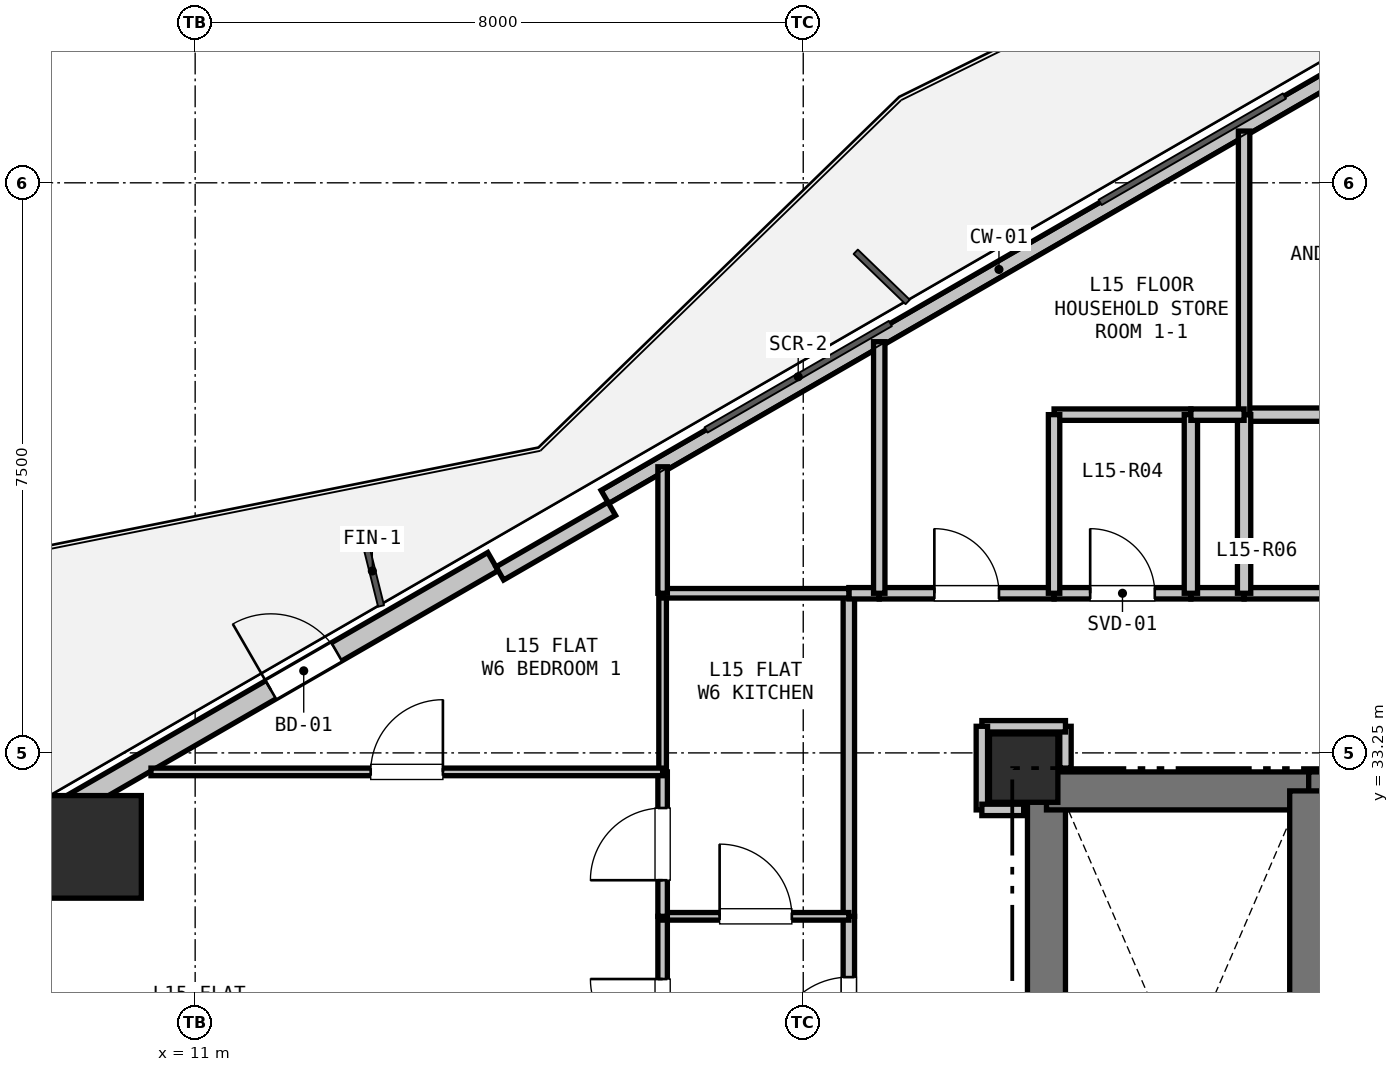
"""IFC4 building model, lengths in metres.
Left out: names, types, materials, properties, quantities, classifications, styles, units other than length and angle.
Written with IfcOpenShell. Run it as: python <this file> out.ifc"""

import sys

from ifc_helpers import new_model, si_unit, direction, frame, frame_2d, origin, origin_2d, place, context, subcontext, project, spatial, rectangle, hollow_rectangle, extrude, element, fill, save


model = new_model("IFC4")
c1 = context("Model", 3, precision=1e-05, world=origin(), true_north=direction((0.0, 1.0)))
c2 = subcontext(c1, "Body", "Model", "MODEL_VIEW")
j1 = project(units=[si_unit("LENGTHUNIT", "METRE"), si_unit("PLANEANGLEUNIT", "RADIAN")], contexts=[c1])
p1 = place(None, origin())
s1 = spatial("IfcSite", under=j1, at=p1, CompositionType="ELEMENT")
p2 = place(p1, origin())
s2 = spatial("IfcBuilding", under=s1, at=p2, CompositionType="ELEMENT")
p3 = place(p2, frame((0.0, 0.0, 55.5)))
s3 = spatial("IfcBuildingStorey", under=s2, at=p3, CompositionType="ELEMENT", Elevation=55.5)
p4 = place(p3, frame((21.9, 33.05, 0.0), z_axis=(0.0, 0.0, 1.0), x_axis=(1.0, 0.0, 0.0)))
e1 = element("IfcColumn", 1, at=p4, inside=s3, PredefinedType="COLUMN", context=c2, shape_type="SweptSolid", body=[
    extrude(rectangle(XDim=0.9, YDim=0.9, at=origin_2d()), origin(), (0.0, 0.0, 1.0), 3.3),
])
p5 = place(p3, frame((9.617, 32.014, 0.0), z_axis=(0.0, 0.0, 1.0), x_axis=(1.0, 0.0, 0.0)))
e2 = element("IfcColumn", 2, at=p5, inside=s3, PredefinedType="COLUMN", context=c2, shape_type="SweptSolid", body=[
    extrude(hollow_rectangle(XDim=1.35, YDim=1.35, WallThickness=0.036, at=origin_2d()), origin(), (0.0, 0.0, 1.0), 3.3),
])
p6 = place(p3, frame((3.943, 29.431, 0.0), z_axis=(0.0, 0.0, 1.0), x_axis=(0.866027105532, 0.499997052475, 0.0)))
e3 = element("IfcWall", 3, at=p6, inside=s3, PredefinedType="SOLIDWALL", context=c2, shape_type="SweptSolid", body=[
    extrude(rectangle(XDim=12.673, YDim=0.275, at=frame_2d((6.336, 0.0))), origin(), (0.0, 0.0, 1.0), 2.66),
])
p7 = place(p6, frame((9.298, 0.0, 0.0)))
e4 = element("IfcOpeningElement", 4, at=p7, cuts=e3, PredefinedType="OPENING", context=c2, shape_type="SweptSolid", body=[
    extrude(rectangle(XDim=1.0, YDim=2.1, at=frame_2d((0.5, 1.05))), frame((0.0, 0.147, 0.0), z_axis=(0.0, -1.0, 0.0), x_axis=(1.0, 0.0, 0.0)), (0.0, 0.0, 1.0), 0.295),
])
p8 = place(p3, frame((16.39, 36.617, 0.0), z_axis=(0.0, 0.0, 1.0), x_axis=(0.866027351828, 0.499996625875, 0.0)))
e5 = element("IfcWall", 5, at=p8, inside=s3, PredefinedType="PARAPET", context=c2, shape_type="SweptSolid", body=[
    extrude(rectangle(XDim=11.973, YDim=0.2, at=frame_2d((5.987, 0.0))), origin(), (0.0, 0.0, 1.0), 0.2),
])
p9 = place(p3, frame((15.008, 35.611, 0.0), z_axis=(0.0, 0.0, 1.0), x_axis=(0.86605165483, 0.499954529098, 0.0)))
e6 = element("IfcWall", 6, at=p9, inside=s3, PredefinedType="PARAPET", context=c2, shape_type="SweptSolid", body=[
    extrude(rectangle(XDim=1.7, YDim=0.2, at=frame_2d((0.85, 0.0))), origin(), (0.0, 0.0, 1.0), 2.66),
])
p10 = place(p3, frame((22.2, 25.4, 0.0), z_axis=(0.0, 0.0, 1.0), x_axis=(0.0, 1.0, 0.0)))
e7 = element("IfcWall", 7, at=p10, inside=s3, PredefinedType="SHEAR", context=c2, shape_type="SweptSolid", body=[
    extrude(rectangle(XDim=7.35, YDim=0.5, at=frame_2d((3.675, 0.0))), origin(), (0.0, 0.0, 1.0), 3.04),
])
p11 = place(p3, frame((22.2, 32.75, 0.0), z_axis=(0.0, 0.0, 1.0), x_axis=(1.0, 0.0, 0.0)))
e8 = element("IfcWall", 8, at=p11, inside=s3, PredefinedType="SHEAR", context=c2, shape_type="SweptSolid", body=[
    extrude(rectangle(XDim=3.45, YDim=0.5, at=frame_2d((1.725, 0.0))), origin(), (0.0, 0.0, 1.0), 3.04),
])
p12 = place(p3, frame((25.65, 32.75, 0.0), z_axis=(0.0, 0.0, 1.0), x_axis=(1.0, 0.0, 0.0)))
e9 = element("IfcWall", 9, at=p12, inside=s3, PredefinedType="SHEAR", context=c2, shape_type="SweptSolid", body=[
    extrude(rectangle(XDim=1.75, YDim=0.5, at=frame_2d((0.875, 0.0))), origin(), (0.0, 0.0, 1.0), 3.04),
])
p13 = place(p12, frame((0.375, 0.0, 0.0)))
e10 = element("IfcOpeningElement", 10, at=p13, cuts=e9, PredefinedType="OPENING", context=c2, shape_type="SweptSolid", body=[
    extrude(rectangle(XDim=1.0, YDim=2.15, at=frame_2d((0.5, 1.075))), frame((0.0, 0.26, 0.0), z_axis=(0.0, -1.0, 0.0), x_axis=(1.0, 0.0, 0.0)), (0.0, 0.0, 1.0), 0.52),
])
p14 = place(p3, frame((25.65, 27.95, 0.0), z_axis=(0.0, 0.0, 1.0), x_axis=(0.0, 1.0, 0.0)))
e11 = element("IfcWall", 11, at=p14, inside=s3, PredefinedType="SHEAR", context=c2, shape_type="SweptSolid", body=[
    extrude(rectangle(XDim=4.8, YDim=0.5, at=frame_2d((2.4, 0.0))), origin(), (0.0, 0.0, 1.0), 3.04),
])
p15 = place(p3, frame((19.6, 28.5, 0.0), z_axis=(0.0, 0.0, 1.0), x_axis=(0.0, 1.0, 0.0)))
e12 = element("IfcWall", 12, at=p15, inside=s3, PredefinedType="PARTITIONING", context=c2, shape_type="SweptSolid", body=[
    extrude(rectangle(XDim=2.6, YDim=0.15, at=frame_2d((1.3, 0.0))), origin(), (0.0, 0.0, 1.0), 3.04),
])
p16 = place(p15, frame((0.8, 0.0, 0.0)))
e13 = element("IfcOpeningElement", 13, at=p16, cuts=e12, PredefinedType="OPENING", context=c2, shape_type="SweptSolid", body=[
    extrude(rectangle(XDim=1.0, YDim=2.15, at=frame_2d((0.5, 1.075))), frame((0.0, 0.085, 0.0), z_axis=(0.0, -1.0, 0.0), x_axis=(1.0, 0.0, 0.0)), (0.0, 0.0, 1.0), 0.17),
])
p17 = place(p3, frame((19.6, 31.1, 0.0), z_axis=(0.0, 0.0, 1.0), x_axis=(0.0, 1.0, 0.0)))
e14 = element("IfcWall", 14, at=p17, inside=s3, PredefinedType="PARTITIONING", context=c2, shape_type="SweptSolid", body=[
    extrude(rectangle(XDim=4.25, YDim=0.15, at=frame_2d((2.125, 0.0))), origin(), (0.0, 0.0, 1.0), 2.337),
])
p18 = place(p3, frame((19.6, 35.35, 0.0), z_axis=(0.0, 0.0, 1.0), x_axis=(1.0, 0.0, 0.0)))
e15 = element("IfcWall", 15, at=p18, inside=s3, PredefinedType="PARTITIONING", context=c2, shape_type="SweptSolid", body=[
    extrude(rectangle(XDim=0.4, YDim=0.15, at=frame_2d((0.2, 0.0))), origin(), (0.0, 0.0, 1.0), 3.04),
])
p19 = place(p3, frame((20.0, 35.35, 0.0), z_axis=(0.0, 0.0, 1.0), x_axis=(1.0, 0.0, 0.0)))
e16 = element("IfcWall", 16, at=p19, inside=s3, PredefinedType="PARTITIONING", context=c2, shape_type="SweptSolid", body=[
    extrude(rectangle(XDim=2.3, YDim=0.15, at=frame_2d((1.15, 0.0))), origin(), (0.0, 0.0, 1.0), 3.04),
])
p20 = place(p19, frame((0.725, 0.0, 0.0)))
e17 = element("IfcOpeningElement", 17, at=p20, cuts=e16, PredefinedType="OPENING", context=c2, shape_type="SweptSolid", body=[
    extrude(rectangle(XDim=0.85, YDim=2.1, at=frame_2d((0.425, 1.05))), frame((0.0, 0.085, 0.0), z_axis=(0.0, -1.0, 0.0), x_axis=(1.0, 0.0, 0.0)), (0.0, 0.0, 1.0), 0.17),
])
p21 = place(p3, frame((22.3, 35.35, 0.0), z_axis=(0.0, 0.0, 1.0), x_axis=(1.0, 0.0, 0.0)))
e18 = element("IfcWall", 18, at=p21, inside=s3, PredefinedType="PARTITIONING", context=c2, shape_type="SweptSolid", body=[
    extrude(rectangle(XDim=1.8, YDim=0.15, at=frame_2d((0.9, 0.0))), origin(), (0.0, 0.0, 1.0), 3.04),
])
p22 = place(p21, frame((0.475, 0.0, 0.0)))
e19 = element("IfcOpeningElement", 19, at=p22, cuts=e18, PredefinedType="OPENING", context=c2, shape_type="SweptSolid", body=[
    extrude(rectangle(XDim=0.85, YDim=2.1, at=frame_2d((0.425, 1.05))), frame((0.0, 0.085, 0.0), z_axis=(0.0, -1.0, 0.0), x_axis=(1.0, 0.0, 0.0)), (0.0, 0.0, 1.0), 0.17),
])
p23 = place(p3, frame((24.1, 35.35, 0.0), z_axis=(0.0, 0.0, 1.0), x_axis=(1.0, 0.0, 0.0)))
e20 = element("IfcWall", 20, at=p23, inside=s3, PredefinedType="PARTITIONING", context=c2, shape_type="SweptSolid", body=[
    extrude(rectangle(XDim=0.7, YDim=0.15, at=frame_2d((0.35, 0.0))), origin(), (0.0, 0.0, 1.0), 3.04),
])
p24 = place(p3, frame((24.8, 35.35, 0.0), z_axis=(0.0, 0.0, 1.0), x_axis=(1.0, 0.0, 0.0)))
e21 = element("IfcWall", 21, at=p24, inside=s3, PredefinedType="PARTITIONING", context=c2, shape_type="SweptSolid", body=[
    extrude(rectangle(XDim=1.9, YDim=0.15, at=frame_2d((0.95, 0.0))), origin(), (0.0, 0.0, 1.0), 3.04),
])
p25 = place(p3, frame((22.45, 33.05, 0.0), z_axis=(0.0, 0.0, 1.0), x_axis=(0.0, 1.0, 0.0)))
e22 = element("IfcWall", 22, at=p25, inside=s3, PredefinedType="PARTITIONING", context=c2, shape_type="SweptSolid", body=[
    extrude(rectangle(XDim=0.55, YDim=0.15, at=frame_2d((0.275, 0.0))), origin(), (0.0, 0.0, 1.0), 2.488),
])
p26 = place(p3, frame((22.45, 33.6, 0.0), z_axis=(0.0, 0.0, 1.0), x_axis=(-1.0, 0.0, 0.0)))
e23 = element("IfcWall", 23, at=p26, inside=s3, PredefinedType="PARTITIONING", context=c2, shape_type="SweptSolid", body=[
    extrude(rectangle(XDim=1.1, YDim=0.15, at=frame_2d((0.55, 0.0))), origin(), (0.0, 0.0, 1.0), 3.04),
])
p27 = place(p3, frame((21.35, 33.6, 0.0), z_axis=(0.0, 0.0, 1.0), x_axis=(0.0, -1.0, 0.0)))
e24 = element("IfcWall", 24, at=p27, inside=s3, PredefinedType="PARTITIONING", context=c2, shape_type="SweptSolid", body=[
    extrude(rectangle(XDim=1.1, YDim=0.15, at=frame_2d((0.55, 0.0))), origin(), (0.0, 0.0, 1.0), 2.337),
])
p28 = place(p3, frame((21.35, 32.5, 0.0), z_axis=(0.0, 0.0, 1.0), x_axis=(1.0, 0.0, 0.0)))
e25 = element("IfcWall", 25, at=p28, inside=s3, PredefinedType="PARTITIONING", context=c2, shape_type="SweptSolid", body=[
    extrude(rectangle(XDim=0.55, YDim=0.15, at=frame_2d((0.275, 0.0))), origin(), (0.0, 0.0, 1.0), 2.488),
])
p29 = place(p3, frame((17.15, 28.5, 0.0), z_axis=(0.0, 0.0, 1.0), x_axis=(0.0, 1.0, 0.0)))
e26 = element("IfcWall", 26, at=p29, inside=s3, PredefinedType="PARTITIONING", context=c2, shape_type="SweptSolid", body=[
    extrude(rectangle(XDim=2.6, YDim=0.125, at=frame_2d((1.3, 0.0))), origin(), (0.0, 0.0, 1.0), 3.04),
])
p30 = place(p29, frame((0.825, 0.0, 0.0)))
e27 = element("IfcOpeningElement", 27, at=p30, cuts=e26, PredefinedType="OPENING", context=c2, shape_type="SweptSolid", body=[
    extrude(rectangle(XDim=0.95, YDim=2.1, at=frame_2d((0.475, 1.05))), frame((0.0, 0.073, 0.0), z_axis=(0.0, -1.0, 0.0), x_axis=(1.0, 0.0, 0.0)), (0.0, 0.0, 1.0), 0.145),
])
p31 = place(p3, frame((17.15, 31.1, 0.0), z_axis=(0.0, 0.0, 1.0), x_axis=(1.0, 0.0, 0.0)))
e28 = element("IfcWall", 28, at=p31, inside=s3, PredefinedType="PARTITIONING", context=c2, shape_type="SweptSolid", body=[
    extrude(rectangle(XDim=2.45, YDim=0.1, at=frame_2d((1.225, 0.0))), origin(), (0.0, 0.0, 1.0), 3.04),
])
p32 = place(p31, frame((0.75, 0.0, 0.0)))
e29 = element("IfcOpeningElement", 29, at=p32, cuts=e28, PredefinedType="OPENING", context=c2, shape_type="SweptSolid", body=[
    extrude(rectangle(XDim=0.95, YDim=2.1, at=frame_2d((0.475, 1.05))), frame((0.0, 0.06, 0.0), z_axis=(0.0, -1.0, 0.0), x_axis=(1.0, 0.0, 0.0)), (0.0, 0.0, 1.0), 0.12),
])
p33 = place(p3, frame((22.3, 37.7, 0.0), z_axis=(0.0, 0.0, 1.0), x_axis=(1.0, 0.0, 0.0)))
e30 = element("IfcWall", 30, at=p33, inside=s3, PredefinedType="PARTITIONING", context=c2, shape_type="SweptSolid", body=[
    extrude(rectangle(XDim=1.8, YDim=0.15, at=frame_2d((0.9, 0.0))), origin(), (0.0, 0.0, 1.0), 3.04),
])
p34 = place(p3, frame((24.1, 37.7, 0.0), z_axis=(0.0, 0.0, 1.0), x_axis=(0.0, -1.0, 0.0)))
e31 = element("IfcWall", 31, at=p34, inside=s3, PredefinedType="PLUMBINGWALL", context=c2, shape_type="SweptSolid", body=[
    extrude(rectangle(XDim=2.35, YDim=0.175, at=frame_2d((1.175, 0.0))), origin(), (0.0, 0.0, 1.0), 3.04),
])
p35 = place(p3, frame((22.3, 35.35, 0.0), z_axis=(0.0, 0.0, 1.0), x_axis=(0.0, 1.0, 0.0)))
e32 = element("IfcWall", 32, at=p35, inside=s3, PredefinedType="PARTITIONING", context=c2, shape_type="SweptSolid", body=[
    extrude(rectangle(XDim=2.35, YDim=0.15, at=frame_2d((1.175, 0.0))), origin(), (0.0, 0.0, 1.0), 3.04),
])
p36 = place(p3, frame((24.8, 37.7, 0.0), z_axis=(0.0, 0.0, 1.0), x_axis=(1.0, 0.0, 0.0)))
e33 = element("IfcWall", 33, at=p36, inside=s3, PredefinedType="PLUMBINGWALL", context=c2, shape_type="SweptSolid", body=[
    extrude(rectangle(XDim=1.9, YDim=0.175, at=frame_2d((0.95, 0.0))), origin(), (0.0, 0.0, 1.0), 3.04),
])
p37 = place(p3, frame((24.8, 35.35, 0.0), z_axis=(0.0, 0.0, 1.0), x_axis=(0.0, 1.0, 0.0)))
e34 = element("IfcWall", 34, at=p37, inside=s3, PredefinedType="PLUMBINGWALL", context=c2, shape_type="SweptSolid", body=[
    extrude(rectangle(XDim=2.35, YDim=0.175, at=frame_2d((1.175, 0.0))), origin(), (0.0, 0.0, 1.0), 3.04),
])
p38 = place(p3, frame((17.15, 31.1, 0.0), z_axis=(0.0, 0.0, 1.0), x_axis=(0.0, 1.0, 0.0)))
e35 = element("IfcWall", 35, at=p38, inside=s3, PredefinedType="PARTITIONING", context=c2, shape_type="SweptSolid", body=[
    extrude(rectangle(XDim=1.9, YDim=0.125, at=frame_2d((0.95, 0.0))), origin(), (0.0, 0.0, 1.0), 2.337),
])
p39 = place(p38, frame((0.475, 0.0, 0.0)))
e36 = element("IfcOpeningElement", 36, at=p39, cuts=e35, PredefinedType="OPENING", context=c2, shape_type="SweptSolid", body=[
    extrude(rectangle(XDim=0.95, YDim=2.1, at=frame_2d((0.475, 1.05))), frame((0.0, 0.073, 0.0), z_axis=(0.0, -1.0, 0.0), x_axis=(1.0, 0.0, 0.0)), (0.0, 0.0, 1.0), 0.145),
])
p40 = place(p3, frame((17.15, 33.0, 0.0), z_axis=(0.0, 0.0, 1.0), x_axis=(0.0, 1.0, 0.0)))
e37 = element("IfcWall", 37, at=p40, inside=s3, PredefinedType="PARTITIONING", context=c2, shape_type="SweptSolid", body=[
    extrude(rectangle(XDim=2.35, YDim=0.1, at=frame_2d((1.175, 0.0))), origin(), (0.0, 0.0, 1.0), 3.04),
])
p41 = place(p3, frame((17.15, 35.35, 0.0), z_axis=(0.0, 0.0, 1.0), x_axis=(1.0, 0.0, 0.0)))
e38 = element("IfcWall", 38, at=p41, inside=s3, PredefinedType="PARTITIONING", context=c2, shape_type="SweptSolid", body=[
    extrude(rectangle(XDim=2.45, YDim=0.125, at=frame_2d((1.225, 0.0))), origin(), (0.0, 0.0, 1.0), 3.04),
])
p42 = place(p3, frame((24.8, 41.431, 0.0), z_axis=(0.0, 0.0, 1.0), x_axis=(0.0, -1.0, 0.0)))
e39 = element("IfcWall", 39, at=p42, inside=s3, PredefinedType="PARTITIONING", context=c2, shape_type="SweptSolid", body=[
    extrude(rectangle(XDim=3.731, YDim=0.15, at=frame_2d((1.865, 0.0))), origin(), (0.0, 0.0, 1.0), 2.365),
])
p43 = place(p3, frame((24.8, 37.7, 0.0), z_axis=(0.0, 0.0, 1.0), x_axis=(-1.0, 0.0, 0.0)))
e40 = element("IfcWall", 40, at=p43, inside=s3, PredefinedType="PARTITIONING", context=c2, shape_type="SweptSolid", body=[
    extrude(rectangle(XDim=0.7, YDim=0.15, at=frame_2d((0.35, 0.0))), origin(), (0.0, 0.0, 1.0), 3.04),
])
p44 = place(p3, frame((20.0, 35.35, 0.0), z_axis=(0.0, 0.0, 1.0), x_axis=(0.0, 1.0, 0.0)))
e41 = element("IfcWall", 41, at=p44, inside=s3, PredefinedType="PARTITIONING", context=c2, shape_type="SweptSolid", body=[
    extrude(rectangle(XDim=3.31, YDim=0.15, at=frame_2d((1.655, 0.0))), origin(), (0.0, 0.0, 1.0), 2.365),
])
p45 = place(p3, frame((10.419, 33.0, 0.0), z_axis=(0.0, 0.0, 1.0), x_axis=(1.0, 0.0, 0.0)))
e42 = element("IfcWall", 42, at=p45, inside=s3, PredefinedType="PARTITIONING", context=c2, shape_type="SweptSolid", body=[
    extrude(rectangle(XDim=6.731, YDim=0.1, at=frame_2d((3.365, 0.0))), origin(), (0.0, 0.0, 1.0), 2.365),
])
p46 = place(p45, frame((2.89, 0.0, 0.0)))
e43 = element("IfcOpeningElement", 43, at=p46, cuts=e42, PredefinedType="OPENING", context=c2, shape_type="SweptSolid", body=[
    extrude(rectangle(XDim=0.95, YDim=2.1, at=frame_2d((0.475, 1.05))), frame((0.0, 0.06, 0.0), z_axis=(0.0, -1.0, 0.0), x_axis=(1.0, 0.0, 0.0)), (0.0, 0.0, 1.0), 0.12),
])
p47 = place(p3, frame((17.15, 37.014, 0.0), z_axis=(0.0, 0.0, 1.0), x_axis=(0.0, -1.0, 0.0)))
e44 = element("IfcWall", 44, at=p47, inside=s3, PredefinedType="PARTITIONING", context=c2, shape_type="SweptSolid", body=[
    extrude(rectangle(XDim=1.664, YDim=0.125, at=frame_2d((0.832, 0.0))), origin(), (0.0, 0.0, 1.0), 2.365),
])
p48 = place(p7, origin())
e45 = element("IfcDoor", 45, at=p48, inside=s3, OperationType="SINGLE_SWING_LEFT", PredefinedType="DOOR", context=c2, shape_type="SweptSolid", body=[
    extrude(rectangle(XDim=1.0, YDim=2.1, at=frame_2d((0.5, 1.05))), frame((0.0, 0.025, 0.0), z_axis=(0.0, -1.0, 0.0), x_axis=(1.0, 0.0, 0.0)), (0.0, 0.0, 1.0), 0.05),
])
fill(e4, e45)
p49 = place(p16, origin())
e46 = element("IfcDoor", 46, at=p49, inside=s3, OperationType="SINGLE_SWING_LEFT", PredefinedType="DOOR", context=c2, shape_type="SweptSolid", body=[
    extrude(rectangle(XDim=1.0, YDim=2.15, at=frame_2d((0.5, 1.075))), frame((0.0, 0.025, 0.0), z_axis=(0.0, -1.0, 0.0), x_axis=(1.0, 0.0, 0.0)), (0.0, 0.0, 1.0), 0.05),
])
fill(e13, e46)
p50 = place(p22, origin())
e47 = element("IfcDoor", 47, at=p50, inside=s3, OperationType="SINGLE_SWING_LEFT", PredefinedType="DOOR", context=c2, shape_type="SweptSolid", body=[
    extrude(rectangle(XDim=0.85, YDim=2.1, at=frame_2d((0.425, 1.05))), frame((0.0, 0.025, 0.0), z_axis=(0.0, -1.0, 0.0), x_axis=(1.0, 0.0, 0.0)), (0.0, 0.0, 1.0), 0.05),
])
fill(e19, e47)
p51 = place(p20, origin())
e48 = element("IfcDoor", 48, at=p51, inside=s3, OperationType="SINGLE_SWING_LEFT", PredefinedType="DOOR", context=c2, shape_type="SweptSolid", body=[
    extrude(rectangle(XDim=0.85, YDim=2.1, at=frame_2d((0.425, 1.05))), frame((0.0, 0.025, 0.0), z_axis=(0.0, -1.0, 0.0), x_axis=(1.0, 0.0, 0.0)), (0.0, 0.0, 1.0), 0.05),
])
fill(e17, e48)
p52 = place(p32, origin())
e49 = element("IfcDoor", 49, at=p52, inside=s3, OperationType="SINGLE_SWING_LEFT", PredefinedType="DOOR", context=c2, shape_type="SweptSolid", body=[
    extrude(rectangle(XDim=0.95, YDim=2.1, at=frame_2d((0.475, 1.05))), frame((0.0, 0.025, 0.0), z_axis=(0.0, -1.0, 0.0), x_axis=(1.0, 0.0, 0.0)), (0.0, 0.0, 1.0), 0.05),
])
fill(e29, e49)
p53 = place(p30, origin())
e50 = element("IfcDoor", 50, at=p53, inside=s3, OperationType="SINGLE_SWING_RIGHT", PredefinedType="DOOR", context=c2, shape_type="SweptSolid", body=[
    extrude(rectangle(XDim=0.95, YDim=2.1, at=frame_2d((0.475, 1.05))), frame((0.0, 0.025, 0.0), z_axis=(0.0, -1.0, 0.0), x_axis=(1.0, 0.0, 0.0)), (0.0, 0.0, 1.0), 0.05),
])
fill(e27, e50)
p54 = place(p39, origin())
e51 = element("IfcDoor", 51, at=p54, inside=s3, OperationType="SINGLE_SWING_LEFT", PredefinedType="DOOR", context=c2, shape_type="SweptSolid", body=[
    extrude(rectangle(XDim=0.95, YDim=2.1, at=frame_2d((0.475, 1.05))), frame((0.0, 0.025, 0.0), z_axis=(0.0, -1.0, 0.0), x_axis=(1.0, 0.0, 0.0)), (0.0, 0.0, 1.0), 0.05),
])
fill(e36, e51)
p55 = place(p46, origin())
e52 = element("IfcDoor", 52, at=p55, inside=s3, OperationType="SINGLE_SWING_RIGHT", PredefinedType="DOOR", context=c2, shape_type="SweptSolid", body=[
    extrude(rectangle(XDim=0.95, YDim=2.1, at=frame_2d((0.475, 1.05))), frame((0.0, 0.025, 0.0), z_axis=(0.0, -1.0, 0.0), x_axis=(1.0, 0.0, 0.0)), (0.0, 0.0, 1.0), 0.05),
])
fill(e43, e52)
save(model, sys.argv[1])
